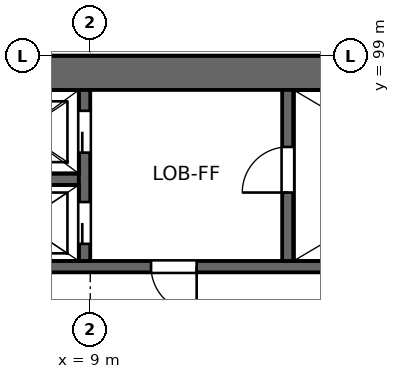
"""IFC4 building model, lengths in metres.
Left out: names, types, materials, properties, quantities, classifications, styles, units other than length and angle.
Written with IfcOpenShell. Run it as: python <this file> out.ifc"""

import sys

from ifc_helpers import new_model, si_unit, direction, frame, frame_2d, origin, place, context, subcontext, project, spatial, rectangle, extrude, element, fill, save


model = new_model("IFC4")
c1 = context("Model", 3, precision=1e-05, world=origin(), true_north=direction((0.0, 1.0)))
c2 = subcontext(c1, "Body", "Model", "MODEL_VIEW")
j1 = project(units=[si_unit("LENGTHUNIT", "METRE"), si_unit("PLANEANGLEUNIT", "RADIAN")], contexts=[c1])
p1 = place(None, origin())
s1 = spatial("IfcSite", under=j1, at=p1, CompositionType="ELEMENT")
p2 = place(p1, origin())
s2 = spatial("IfcBuilding", under=s1, at=p2, CompositionType="ELEMENT")
p3 = place(p2, frame((0.0, 0.0, 65.4)))
s3 = spatial("IfcBuildingStorey", under=s2, at=p3, CompositionType="ELEMENT", Elevation=65.4)
p4 = place(p3, frame((94.5, 98.55, 0.0), z_axis=(0.0, 0.0, 1.0), x_axis=(-1.0, 0.0, 0.0)))
e1 = element("IfcWall", 1, at=p4, inside=s3, PredefinedType="SHEAR", context=c2, shape_type="SweptSolid", body=[
    extrude(rectangle(XDim=90.0, YDim=0.9, at=frame_2d((45.0, 0.0))), origin(), (0.0, 0.0, 1.0), 3.7),
])
p5 = place(p3, frame((0.9, 93.45, -0.4), z_axis=(0.0, 0.0, 1.0), x_axis=(1.0, 0.0, 0.0)))
e2 = element("IfcWall", 2, at=p5, inside=s3, PredefinedType="SOLIDWALL", context=c2, shape_type="SweptSolid", body=[
    extrude(rectangle(XDim=34.6, YDim=0.3, at=frame_2d((17.3, 0.0))), origin(), (0.0, 0.0, 1.0), 3.7),
])
p6 = place(p5, frame((9.7, 0.0, 0.4)))
e3 = element("IfcOpeningElement", 3, at=p6, cuts=e2, PredefinedType="OPENING", context=c2, shape_type="SweptSolid", body=[
    extrude(rectangle(XDim=1.2, YDim=2.1, at=frame_2d((0.6, 1.05))), frame((0.0, 0.15, 0.0), z_axis=(0.0, -1.0, 0.0), x_axis=(1.0, 0.0, 0.0)), (0.0, 0.0, 1.0), 0.3),
])
p7 = place(p5, frame((24.3, 0.0, 0.4)))
e4 = element("IfcOpeningElement", 4, at=p7, cuts=e2, PredefinedType="OPENING", context=c2, shape_type="SweptSolid", body=[
    extrude(rectangle(XDim=1.0, YDim=2.1, at=frame_2d((0.5, 1.05))), frame((0.0, 0.15, 0.0), z_axis=(0.0, -1.0, 0.0), x_axis=(1.0, 0.0, 0.0)), (0.0, 0.0, 1.0), 0.3),
])
p8 = place(p5, frame((31.125, 0.0, 0.4)))
e5 = element("IfcOpeningElement", 5, at=p8, cuts=e2, PredefinedType="OPENING", context=c2, shape_type="SweptSolid", body=[
    extrude(rectangle(XDim=1.0, YDim=2.1, at=frame_2d((0.5, 1.05))), frame((0.0, 0.15, 0.0), z_axis=(0.0, -1.0, 0.0), x_axis=(1.0, 0.0, 0.0)), (0.0, 0.0, 1.0), 0.3),
])
p9 = place(p3, frame((5.7, 95.75, -0.4), z_axis=(0.0, 0.0, 1.0), x_axis=(1.0, 0.0, 0.0)))
e6 = element("IfcWall", 6, at=p9, inside=s3, PredefinedType="SOLIDWALL", context=c2, shape_type="SweptSolid", body=[
    extrude(rectangle(XDim=3.0, YDim=0.3, at=frame_2d((1.5, 0.0))), origin(), (0.0, 0.0, 1.0), 3.7),
])
p10 = place(p3, frame((8.85, 93.6, -0.4), z_axis=(0.0, 0.0, 1.0), x_axis=(0.0, 1.0, 0.0)))
e7 = element("IfcWall", 7, at=p10, inside=s3, PredefinedType="SOLIDWALL", context=c2, shape_type="SweptSolid", body=[
    extrude(rectangle(XDim=4.5, YDim=0.3, at=frame_2d((2.25, 0.0))), origin(), (0.0, 0.0, 1.0), 3.7),
])
p11 = place(p10, frame((0.45, 0.0, 0.4)))
e8 = element("IfcOpeningElement", 8, at=p11, cuts=e7, PredefinedType="OPENING", context=c2, shape_type="SweptSolid", body=[
    extrude(rectangle(XDim=1.1, YDim=2.1, at=frame_2d((0.55, 1.05))), frame((0.0, 0.15, 0.0), z_axis=(0.0, -1.0, 0.0), x_axis=(1.0, 0.0, 0.0)), (0.0, 0.0, 1.0), 0.3),
])
p12 = place(p10, frame((2.85, 0.0, 0.4)))
e9 = element("IfcOpeningElement", 9, at=p12, cuts=e7, PredefinedType="OPENING", context=c2, shape_type="SweptSolid", body=[
    extrude(rectangle(XDim=1.1, YDim=2.1, at=frame_2d((0.55, 1.05))), frame((0.0, 0.15, 0.0), z_axis=(0.0, -1.0, 0.0), x_axis=(1.0, 0.0, 0.0)), (0.0, 0.0, 1.0), 0.3),
])
p13 = place(p3, frame((14.2, 93.6, -0.4), z_axis=(0.0, 0.0, 1.0), x_axis=(0.0, 1.0, 0.0)))
e10 = element("IfcWall", 10, at=p13, inside=s3, PredefinedType="SOLIDWALL", context=c2, shape_type="SweptSolid", body=[
    extrude(rectangle(XDim=4.5, YDim=0.3, at=frame_2d((2.25, 0.0))), origin(), (0.0, 0.0, 1.0), 3.7),
])
p14 = place(p13, frame((1.8, 0.0, 0.4)))
e11 = element("IfcOpeningElement", 11, at=p14, cuts=e10, PredefinedType="OPENING", context=c2, shape_type="SweptSolid", body=[
    extrude(rectangle(XDim=1.2, YDim=2.1, at=frame_2d((0.6, 1.05))), frame((0.0, 0.15, 0.0), z_axis=(0.0, -1.0, 0.0), x_axis=(1.0, 0.0, 0.0)), (0.0, 0.0, 1.0), 0.3),
])
p15 = place(p11, origin())
e12 = element("IfcDoor", 12, at=p15, inside=s3, OperationType="SLIDING_TO_RIGHT", PredefinedType="DOOR", context=c2, shape_type="SweptSolid", body=[
    extrude(rectangle(XDim=1.1, YDim=2.1, at=frame_2d((0.55, 1.05))), frame((0.0, 0.025, 0.0), z_axis=(0.0, -1.0, 0.0), x_axis=(1.0, 0.0, 0.0)), (0.0, 0.0, 1.0), 0.05),
])
fill(e8, e12)
p16 = place(p12, origin())
e13 = element("IfcDoor", 13, at=p16, inside=s3, OperationType="SLIDING_TO_LEFT", PredefinedType="DOOR", context=c2, shape_type="SweptSolid", body=[
    extrude(rectangle(XDim=1.1, YDim=2.1, at=frame_2d((0.55, 1.05))), frame((0.0, 0.025, 0.0), z_axis=(0.0, -1.0, 0.0), x_axis=(1.0, 0.0, 0.0)), (0.0, 0.0, 1.0), 0.05),
])
fill(e9, e13)
p17 = place(p6, frame((1.2, 0.0, 0.0), z_axis=(0.0, 0.0, 1.0), x_axis=(-1.0, 0.0, 0.0)))
e14 = element("IfcDoor", 14, at=p17, inside=s3, OperationType="SINGLE_SWING_LEFT", PredefinedType="DOOR", context=c2, shape_type="SweptSolid", body=[
    extrude(rectangle(XDim=1.2, YDim=2.1, at=frame_2d((0.6, 1.05))), frame((0.0, 0.025, 0.0), z_axis=(0.0, -1.0, 0.0), x_axis=(1.0, 0.0, 0.0)), (0.0, 0.0, 1.0), 0.05),
])
fill(e3, e14)
p18 = place(p14, origin())
e15 = element("IfcDoor", 15, at=p18, inside=s3, OperationType="SINGLE_SWING_LEFT", PredefinedType="DOOR", context=c2, shape_type="SweptSolid", body=[
    extrude(rectangle(XDim=1.2, YDim=2.1, at=frame_2d((0.6, 1.05))), frame((0.0, 0.025, 0.0), z_axis=(0.0, -1.0, 0.0), x_axis=(1.0, 0.0, 0.0)), (0.0, 0.0, 1.0), 0.05),
])
fill(e11, e15)
save(model, sys.argv[1])
